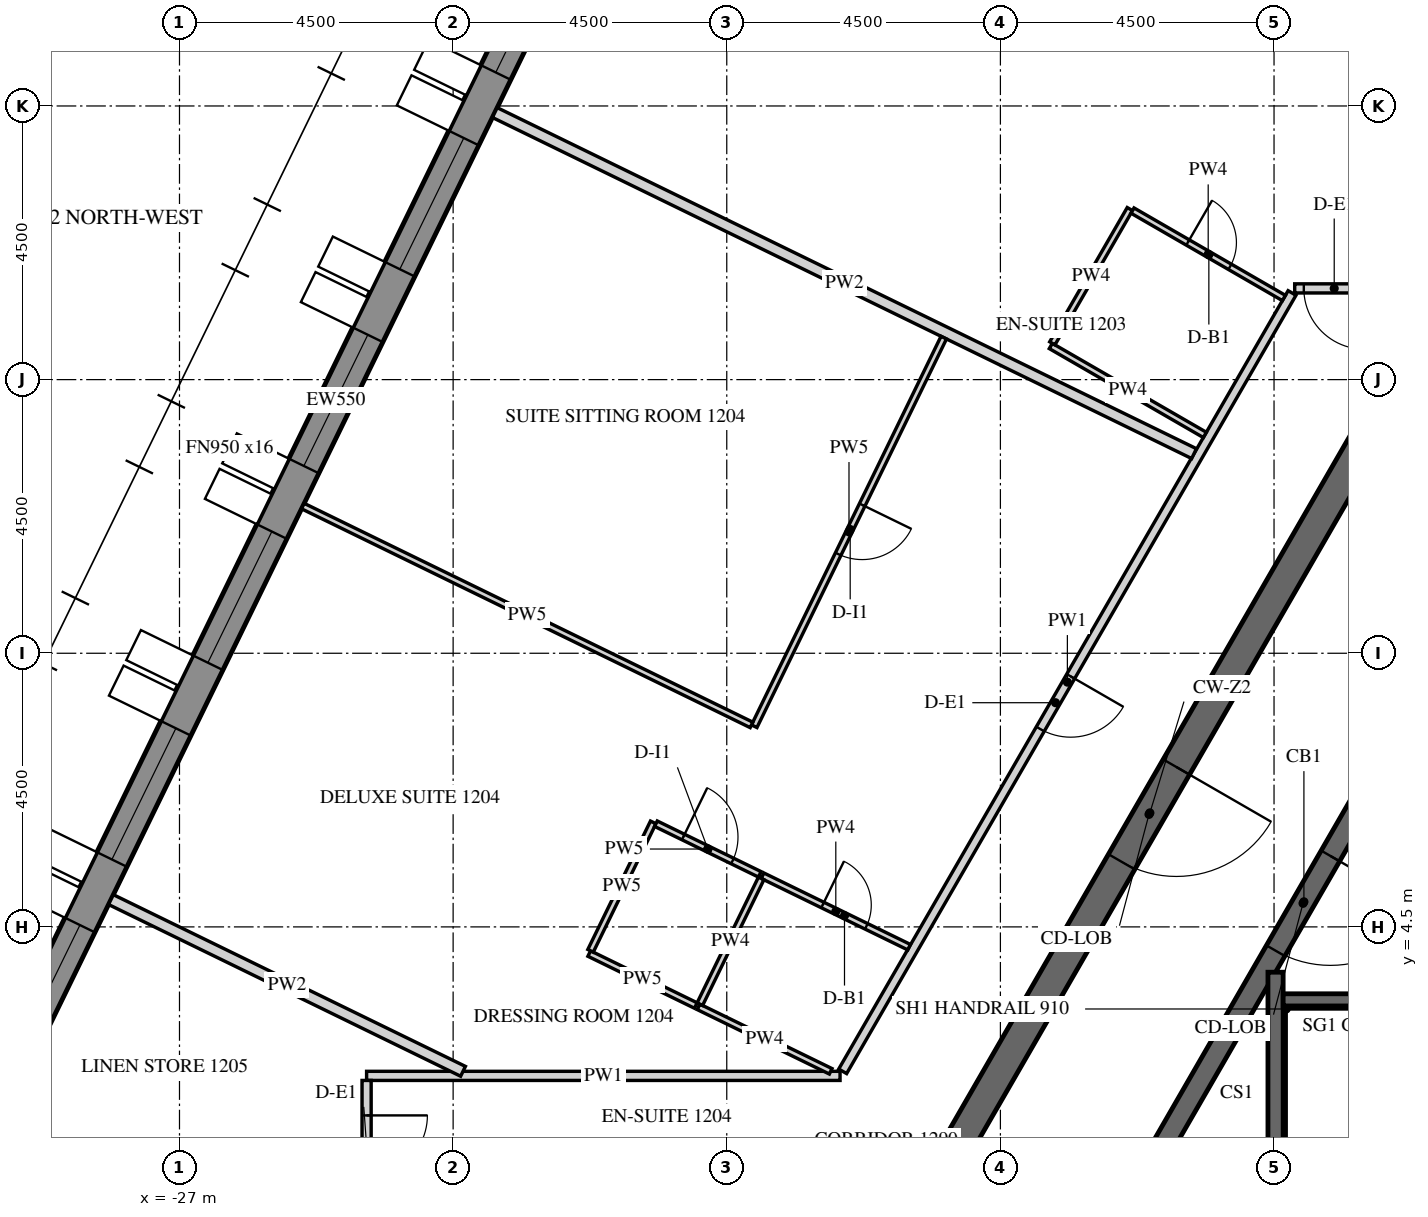
"""IFC4 building model, lengths in metres.
Left out: names, types, materials, properties, quantities, classifications, styles, units other than length and angle.
Written with IfcOpenShell. Run it as: python <this file> out.ifc"""

import sys

from ifc_helpers import new_model, si_unit, direction, frame, frame_2d, origin, place, context, subcontext, project, spatial, polyline, rectangle, outline, extrude, element, fill, save


model = new_model("IFC4")
c1 = context("Model", 3, precision=1e-05, world=origin(), true_north=direction((0.0, 1.0)))
c2 = subcontext(c1, "Body", "Model", "MODEL_VIEW")
j1 = project(units=[si_unit("LENGTHUNIT", "METRE"), si_unit("PLANEANGLEUNIT", "RADIAN")], contexts=[c1])
p1 = place(None, origin())
s1 = spatial("IfcSite", under=j1, at=p1, CompositionType="ELEMENT")
p2 = place(p1, origin())
s2 = spatial("IfcBuilding", under=s1, at=p2, CompositionType="ELEMENT")
p3 = place(p2, frame((0.0, 0.0, 164.4)))
s3 = spatial("IfcBuildingStorey", under=s2, at=p3, CompositionType="ELEMENT", Elevation=164.4)
p4 = place(p3, frame((-18.345, 25.633, -0.15), z_axis=(0.0, 0.0, 1.0), x_axis=(-0.43837181828, -0.898793718791, 0.0)))
e1 = element("IfcWall", 1, at=p4, inside=s3, PredefinedType="SOLIDWALL", context=c2, shape_type="SweptSolid", body=[
    extrude(outline(polyline([(-0.026, -0.275), (27.78, -0.275), (27.735, 0.275), (0.026, 0.275), (-0.026, -0.275)])), origin(), (0.0, 0.0, 1.0), 3.9),
])
p5 = place(p4, frame((1.879, 0.0, 1.05)))
e2 = element("IfcOpeningElement", 2, at=p5, cuts=e1, PredefinedType="OPENING", context=c2, shape_type="SweptSolid", body=[
    extrude(rectangle(XDim=2.4, YDim=2.4, at=frame_2d((1.2, 1.2))), frame((0.0, 0.285, 0.0), z_axis=(0.0, -1.0, 0.0), x_axis=(1.0, 0.0, 0.0)), (0.0, 0.0, 1.0), 0.57),
])
p6 = place(p4, frame((5.479, 0.0, 1.05)))
e3 = element("IfcOpeningElement", 3, at=p6, cuts=e1, PredefinedType="OPENING", context=c2, shape_type="SweptSolid", body=[
    extrude(rectangle(XDim=2.4, YDim=2.4, at=frame_2d((1.2, 1.2))), frame((0.0, 0.285, 0.0), z_axis=(0.0, -1.0, 0.0), x_axis=(1.0, 0.0, 0.0)), (0.0, 0.0, 1.0), 0.57),
])
p7 = place(p4, frame((9.079, 0.0, 1.05)))
e4 = element("IfcOpeningElement", 4, at=p7, cuts=e1, PredefinedType="OPENING", context=c2, shape_type="SweptSolid", body=[
    extrude(rectangle(XDim=2.4, YDim=2.4, at=frame_2d((1.2, 1.2))), frame((0.0, 0.285, 0.0), z_axis=(0.0, -1.0, 0.0), x_axis=(1.0, 0.0, 0.0)), (0.0, 0.0, 1.0), 0.57),
])
p8 = place(p4, frame((12.679, 0.0, 1.05)))
e5 = element("IfcOpeningElement", 5, at=p8, cuts=e1, PredefinedType="OPENING", context=c2, shape_type="SweptSolid", body=[
    extrude(rectangle(XDim=2.4, YDim=2.4, at=frame_2d((1.2, 1.2))), frame((0.0, 0.285, 0.0), z_axis=(0.0, -1.0, 0.0), x_axis=(1.0, 0.0, 0.0)), (0.0, 0.0, 1.0), 0.57),
])
p9 = place(p4, frame((16.279, 0.0, 1.05)))
e6 = element("IfcOpeningElement", 6, at=p9, cuts=e1, PredefinedType="OPENING", context=c2, shape_type="SweptSolid", body=[
    extrude(rectangle(XDim=2.4, YDim=2.4, at=frame_2d((1.2, 1.2))), frame((0.0, 0.285, 0.0), z_axis=(0.0, -1.0, 0.0), x_axis=(1.0, 0.0, 0.0)), (0.0, 0.0, 1.0), 0.57),
])
p10 = place(p4, frame((19.879, 0.0, 1.05)))
e7 = element("IfcOpeningElement", 7, at=p10, cuts=e1, PredefinedType="OPENING", context=c2, shape_type="SweptSolid", body=[
    extrude(rectangle(XDim=2.4, YDim=2.4, at=frame_2d((1.2, 1.2))), frame((0.0, 0.285, 0.0), z_axis=(0.0, -1.0, 0.0), x_axis=(1.0, 0.0, 0.0)), (0.0, 0.0, 1.0), 0.57),
])
p11 = place(p4, frame((23.479, 0.0, 1.05)))
e8 = element("IfcOpeningElement", 8, at=p11, cuts=e1, PredefinedType="OPENING", context=c2, shape_type="SweptSolid", body=[
    extrude(rectangle(XDim=2.4, YDim=2.4, at=frame_2d((1.2, 1.2))), frame((0.0, 0.285, 0.0), z_axis=(0.0, -1.0, 0.0), x_axis=(1.0, 0.0, 0.0)), (0.0, 0.0, 1.0), 0.57),
])
p12 = place(p3, frame((-7.361, 12.75, -0.15), z_axis=(0.0, 0.0, 1.0), x_axis=(-0.50000571537, -0.866022103989, 0.0)))
e9 = element("IfcWall", 9, at=p12, inside=s3, PredefinedType="SHEAR", context=c2, shape_type="SweptSolid", body=[
    extrude(outline(polyline([(-0.144, -0.25), (14.867, -0.25), (14.578, 0.25), (0.144, 0.25), (-0.144, -0.25)])), origin(), (0.0, 0.0, 1.0), 3.9),
])
p13 = place(p12, frame((6.49, 0.0, 0.15)))
e10 = element("IfcOpeningElement", 10, at=p13, cuts=e9, PredefinedType="OPENING", context=c2, shape_type="SweptSolid", body=[
    extrude(rectangle(XDim=1.8, YDim=2.4, at=frame_2d((0.9, 1.2))), frame((0.0, 0.26, 0.0), z_axis=(0.0, -1.0, 0.0), x_axis=(1.0, 0.0, 0.0)), (0.0, 0.0, 1.0), 0.52),
])
p14 = place(p3, frame((-5.673, 9.825, -0.15), z_axis=(0.0, 0.0, 1.0), x_axis=(-0.499995046907, -0.866028263435, 0.0)))
e11 = element("IfcWall", 11, at=p14, inside=s3, PredefinedType="SHEAR", context=c2, shape_type="SweptSolid", body=[
    extrude(outline(polyline([(-0.101, -0.175), (11.446, -0.175), (11.244, 0.175), (0.101, 0.175), (-0.101, -0.175)])), origin(), (0.0, 0.0, 1.0), 3.9),
])
p15 = place(p14, frame((4.801, 0.0, 0.15)))
e12 = element("IfcOpeningElement", 12, at=p15, cuts=e11, PredefinedType="OPENING", context=c2, shape_type="SweptSolid", body=[
    extrude(rectangle(XDim=1.8, YDim=2.4, at=frame_2d((0.9, 1.2))), frame((0.0, 0.185, 0.0), z_axis=(0.0, -1.0, 0.0), x_axis=(1.0, 0.0, 0.0)), (0.0, 0.0, 1.0), 0.37),
])
p16 = place(p3, frame((-8.975, -3.755, -0.25), z_axis=(0.0, 0.0, 1.0), x_axis=(0.0, 1.0, 0.0)))
e13 = element("IfcWall", 13, at=p16, inside=s3, PredefinedType="SHEAR", context=c2, shape_type="SweptSolid", body=[
    extrude(rectangle(XDim=7.51, YDim=0.25, at=frame_2d((3.755, 0.0))), origin(), (0.0, 0.0, 1.0), 3.9),
])
p17 = place(p3, frame((-8.85, 3.3, -0.25), z_axis=(0.0, 0.0, 1.0), x_axis=(1.0, 0.0, 0.0)))
e14 = element("IfcWall", 14, at=p17, inside=s3, PredefinedType="SHEAR", context=c2, shape_type="SweptSolid", body=[
    extrude(rectangle(XDim=2.95, YDim=0.2, at=frame_2d((1.475, 0.0))), origin(), (0.0, 0.0, 1.0), 3.9),
])
p18 = place(p3, frame((6.207, 15.0, 0.0), z_axis=(0.0, 0.0, 1.0), x_axis=(-1.0, 0.0, 0.0)))
e15 = element("IfcWall", 15, at=p18, inside=s3, PredefinedType="PARTITIONING", context=c2, shape_type="SweptSolid", body=[
    extrude(rectangle(XDim=14.867, YDim=0.15, at=frame_2d((7.433, 0.0))), origin(), (0.0, 0.0, 1.0), 2.988),
])
p19 = place(p18, frame((1.424, 0.0, 0.0)))
e16 = element("IfcOpeningElement", 16, at=p19, cuts=e15, PredefinedType="OPENING", context=c2, shape_type="SweptSolid", body=[
    extrude(rectangle(XDim=1.0, YDim=2.1, at=frame_2d((0.5, 1.05))), frame((0.0, 0.085, 0.0), z_axis=(0.0, -1.0, 0.0), x_axis=(1.0, 0.0, 0.0)), (0.0, 0.0, 1.0), 0.17),
])
p20 = place(p18, frame((10.424, 0.0, 0.0)))
e17 = element("IfcOpeningElement", 17, at=p20, cuts=e15, PredefinedType="OPENING", context=c2, shape_type="SweptSolid", body=[
    extrude(rectangle(XDim=1.0, YDim=2.1, at=frame_2d((0.5, 1.05))), frame((0.0, 0.085, 0.0), z_axis=(0.0, -1.0, 0.0), x_axis=(1.0, 0.0, 0.0)), (0.0, 0.0, 1.0), 0.17),
])
p21 = place(p18, frame((13.717, 0.0, 0.0)))
e18 = element("IfcOpeningElement", 18, at=p21, cuts=e15, PredefinedType="OPENING", context=c2, shape_type="SweptSolid", body=[
    extrude(rectangle(XDim=1.0, YDim=2.1, at=frame_2d((0.5, 1.05))), frame((0.0, 0.085, 0.0), z_axis=(0.0, -1.0, 0.0), x_axis=(1.0, 0.0, 0.0)), (0.0, 0.0, 1.0), 0.17),
])
p22 = place(p3, frame((-8.704, 14.925, 0.0), z_axis=(0.0, 0.0, 1.0), x_axis=(-0.499988884089, -0.866031821464, 0.0)))
e19 = element("IfcWall", 19, at=p22, inside=s3, PredefinedType="PARTITIONING", context=c2, shape_type="SweptSolid", body=[
    extrude(rectangle(XDim=14.78, YDim=0.15, at=frame_2d((7.39, 0.0))), origin(), (0.0, 0.0, 1.0), 2.988),
])
p23 = place(p22, frame((7.281, 0.0, 0.0)))
e20 = element("IfcOpeningElement", 20, at=p23, cuts=e19, PredefinedType="OPENING", context=c2, shape_type="SweptSolid", body=[
    extrude(rectangle(XDim=1.0, YDim=2.1, at=frame_2d((0.5, 1.05))), frame((0.0, 0.085, 0.0), z_axis=(0.0, -1.0, 0.0), x_axis=(1.0, 0.0, 0.0)), (0.0, 0.0, 1.0), 0.17),
])
p24 = place(p3, frame((-16.137, 2.05, 0.0), z_axis=(0.0, 0.0, 1.0), x_axis=(-1.0, 0.0, 0.0)))
e21 = element("IfcWall", 21, at=p24, inside=s3, PredefinedType="PARTITIONING", context=c2, shape_type="SweptSolid", body=[
    extrude(rectangle(XDim=7.786, YDim=0.15, at=frame_2d((3.893, 0.0))), origin(), (0.0, 0.0, 1.0), 2.988),
])
p25 = place(p3, frame((-23.923, 1.975, 0.0), z_axis=(0.0, 0.0, 1.0), x_axis=(0.0, -1.0, 0.0)))
e22 = element("IfcWall", 22, at=p25, inside=s3, PredefinedType="PARTITIONING", context=c2, shape_type="SweptSolid", body=[
    extrude(rectangle(XDim=1.725, YDim=0.15, at=frame_2d((0.863, 0.0))), origin(), (0.0, 0.0, 1.0), 2.988),
])
p26 = place(p25, frame((0.575, 0.0, 0.0)))
e23 = element("IfcOpeningElement", 23, at=p26, cuts=e22, PredefinedType="OPENING", context=c2, shape_type="SweptSolid", body=[
    extrude(rectangle(XDim=1.0, YDim=2.1, at=frame_2d((0.5, 1.05))), frame((0.0, 0.085, 0.0), z_axis=(0.0, -1.0, 0.0), x_axis=(1.0, 0.0, 0.0)), (0.0, 0.0, 1.0), 0.17),
])
p27 = place(p3, frame((-10.138, 12.591, 0.0), z_axis=(0.0, 0.0, 1.0), x_axis=(-0.866025730634, 0.499999433879, 0.0)))
e24 = element("IfcWall", 24, at=p27, inside=s3, PredefinedType="PARTITIONING", context=c2, shape_type="SweptSolid", body=[
    extrude(rectangle(XDim=2.925, YDim=0.1, at=frame_2d((1.462, 0.0))), origin(), (0.0, 0.0, 1.0), 2.988),
])
p28 = place(p3, frame((-12.646, 14.096, 0.0), z_axis=(0.0, 0.0, 1.0), x_axis=(0.500020783669, 0.866013403995, 0.0)))
e25 = element("IfcWall", 25, at=p28, inside=s3, PredefinedType="PARTITIONING", context=c2, shape_type="SweptSolid", body=[
    extrude(rectangle(XDim=2.55, YDim=0.1, at=frame_2d((1.275, 0.0))), origin(), (0.0, 0.0, 1.0), 2.988),
])
p29 = place(p3, frame((-11.328, 16.28, 0.0), z_axis=(0.0, 0.0, 1.0), x_axis=(0.865981939951, -0.500075274012, 0.0)))
e26 = element("IfcWall", 26, at=p29, inside=s3, PredefinedType="PARTITIONING", context=c2, shape_type="SweptSolid", body=[
    extrude(rectangle(XDim=2.875, YDim=0.1, at=frame_2d((1.438, 0.0))), origin(), (0.0, 0.0, 1.0), 2.988),
])
p30 = place(p29, frame((1.05, 0.0, 0.0)))
e27 = element("IfcOpeningElement", 27, at=p30, cuts=e26, PredefinedType="OPENING", context=c2, shape_type="SweptSolid", body=[
    extrude(rectangle(XDim=0.8, YDim=2.1, at=frame_2d((0.4, 1.05))), frame((0.0, 0.06, 0.0), z_axis=(0.0, -1.0, 0.0), x_axis=(1.0, 0.0, 0.0)), (0.0, 0.0, 1.0), 0.12),
])
p31 = place(p3, frame((-21.815, 17.892, 0.0), z_axis=(0.0, 0.0, 1.0), x_axis=(0.898799253997, -0.438360469265, 0.0)))
e28 = element("IfcWall", 28, at=p31, inside=s3, PredefinedType="PARTITIONING", context=c2, shape_type="SweptSolid", body=[
    extrude(rectangle(XDim=12.794, YDim=0.18, at=frame_2d((6.397, 0.0))), origin(), (0.0, 0.0, 1.0), 2.988),
])
p32 = place(p3, frame((-16.291, 2.125, 0.0), z_axis=(0.0, 0.0, 1.0), x_axis=(-0.898785911157, 0.438387825909, 0.0)))
e29 = element("IfcWall", 29, at=p32, inside=s3, PredefinedType="PARTITIONING", context=c2, shape_type="SweptSolid", body=[
    extrude(rectangle(XDim=2.418, YDim=0.1, at=frame_2d((1.209, 0.0))), origin(), (0.0, 0.0, 1.0), 2.988),
])
p33 = place(p3, frame((-17.412, 5.342, 0.0), z_axis=(0.0, 0.0, 1.0), x_axis=(0.898825304183, -0.43830705283, 0.0)))
e30 = element("IfcWall", 30, at=p33, inside=s3, PredefinedType="PARTITIONING", context=c2, shape_type="SweptSolid", body=[
    extrude(rectangle(XDim=2.682, YDim=0.1, at=frame_2d((1.341, 0.0))), origin(), (0.0, 0.0, 1.0), 2.988),
])
p34 = place(p33, frame((1.1, 0.0, 0.0)))
e31 = element("IfcOpeningElement", 31, at=p34, cuts=e30, PredefinedType="OPENING", context=c2, shape_type="SweptSolid", body=[
    extrude(rectangle(XDim=0.8, YDim=2.1, at=frame_2d((0.4, 1.05))), frame((0.0, 0.06, 0.0), z_axis=(0.0, -1.0, 0.0), x_axis=(1.0, 0.0, 0.0)), (0.0, 0.0, 1.0), 0.12),
])
p35 = place(p3, frame((-18.509, 3.207, 0.0), z_axis=(0.0, 0.0, 1.0), x_axis=(-0.898815368173, 0.438327427772, 0.0)))
e32 = element("IfcWall", 32, at=p35, inside=s3, PredefinedType="PARTITIONING", context=c2, shape_type="SweptSolid", body=[
    extrude(rectangle(XDim=1.95, YDim=0.1, at=frame_2d((0.975, 0.0))), origin(), (0.0, 0.0, 1.0), 2.988),
])
p36 = place(p3, frame((-20.24, 4.107, 0.0), z_axis=(0.0, 0.0, 1.0), x_axis=(0.438382697704, 0.89878841245, 0.0)))
e33 = element("IfcWall", 33, at=p36, inside=s3, PredefinedType="PARTITIONING", context=c2, shape_type="SweptSolid", body=[
    extrude(rectangle(XDim=2.35, YDim=0.1, at=frame_2d((1.175, 0.0))), origin(), (0.0, 0.0, 1.0), 2.988),
])
p37 = place(p3, frame((-19.165, 6.197, 0.0), z_axis=(0.0, 0.0, 1.0), x_axis=(0.898753624926, -0.43845401319, 0.0)))
e34 = element("IfcWall", 34, at=p37, inside=s3, PredefinedType="PARTITIONING", context=c2, shape_type="SweptSolid", body=[
    extrude(rectangle(XDim=1.9, YDim=0.1, at=frame_2d((0.95, 0.0))), origin(), (0.0, 0.0, 1.0), 2.988),
])
p38 = place(p37, frame((0.5, 0.0, 0.0)))
e35 = element("IfcOpeningElement", 35, at=p38, cuts=e34, PredefinedType="OPENING", context=c2, shape_type="SweptSolid", body=[
    extrude(rectangle(XDim=0.9, YDim=2.1, at=frame_2d((0.45, 1.05))), frame((0.0, 0.06, 0.0), z_axis=(0.0, -1.0, 0.0), x_axis=(1.0, 0.0, 0.0)), (0.0, 0.0, 1.0), 0.12),
])
p39 = place(p3, frame((-14.431, 14.19, 0.0), z_axis=(0.0, 0.0, 1.0), x_axis=(-0.438387776054, -0.898785935475, 0.0)))
e36 = element("IfcWall", 36, at=p39, inside=s3, PredefinedType="PARTITIONING", context=c2, shape_type="SweptSolid", body=[
    extrude(rectangle(XDim=7.11, YDim=0.1, at=frame_2d((3.555, 0.0))), origin(), (0.0, 0.0, 1.0), 2.988),
])
p40 = place(p39, frame((3.06, 0.0, 0.0)))
e37 = element("IfcOpeningElement", 37, at=p40, cuts=e36, PredefinedType="OPENING", context=c2, shape_type="SweptSolid", body=[
    extrude(rectangle(XDim=0.9, YDim=2.1, at=frame_2d((0.45, 1.05))), frame((0.0, 0.06, 0.0), z_axis=(0.0, -1.0, 0.0), x_axis=(1.0, 0.0, 0.0)), (0.0, 0.0, 1.0), 0.12),
])
p41 = place(p3, frame((-17.593, 7.822, 0.0), z_axis=(0.0, 0.0, 1.0), x_axis=(-0.898803316846, 0.438352138842, 0.0)))
e38 = element("IfcWall", 38, at=p41, inside=s3, PredefinedType="PARTITIONING", context=c2, shape_type="SweptSolid", body=[
    extrude(rectangle(XDim=8.208, YDim=0.1, at=frame_2d((4.104, 0.0))), origin(), (0.0, 0.0, 1.0), 2.988),
])
p42 = place(p3, frame((-28.127, 4.949, 0.0), z_axis=(0.0, 0.0, 1.0), x_axis=(0.898795032868, -0.438369124017, 0.0)))
e39 = element("IfcWall", 39, at=p42, inside=s3, PredefinedType="PARTITIONING", context=c2, shape_type="SweptSolid", body=[
    extrude(rectangle(XDim=6.442, YDim=0.18, at=frame_2d((3.221, 0.0))), origin(), (0.0, 0.0, 1.0), 2.988),
])
p43 = place(p3, frame((-17.434, 5.297, 0.0), z_axis=(0.0, 0.0, 1.0), x_axis=(-0.438402718006, -0.898778647302, 0.0)))
e40 = element("IfcWall", 40, at=p43, inside=s3, PredefinedType="PARTITIONING", context=c2, shape_type="SweptSolid", body=[
    extrude(rectangle(XDim=2.3, YDim=0.1, at=frame_2d((1.15, 0.0))), origin(), (0.0, 0.0, 1.0), 2.988),
])
p44 = place(p6, frame((0.0, 0.205, 0.0)))
e41 = element("IfcWindow", 41, at=p44, inside=s3, PartitioningType="DOUBLE_PANEL_VERTICAL", PredefinedType="WINDOW", context=c2, shape_type="SweptSolid", body=[
    extrude(rectangle(XDim=2.4, YDim=2.4, at=frame_2d((1.2, 1.2))), frame((0.0, 0.03, 0.0), z_axis=(0.0, -1.0, 0.0), x_axis=(1.0, 0.0, 0.0)), (0.0, 0.0, 1.0), 0.06),
])
fill(e3, e41)
p45 = place(p7, frame((0.0, 0.205, 0.0)))
e42 = element("IfcWindow", 42, at=p45, inside=s3, PartitioningType="DOUBLE_PANEL_VERTICAL", PredefinedType="WINDOW", context=c2, shape_type="SweptSolid", body=[
    extrude(rectangle(XDim=2.4, YDim=2.4, at=frame_2d((1.2, 1.2))), frame((0.0, 0.03, 0.0), z_axis=(0.0, -1.0, 0.0), x_axis=(1.0, 0.0, 0.0)), (0.0, 0.0, 1.0), 0.06),
])
fill(e4, e42)
p46 = place(p8, frame((0.0, 0.205, 0.0)))
e43 = element("IfcWindow", 43, at=p46, inside=s3, PartitioningType="DOUBLE_PANEL_VERTICAL", PredefinedType="WINDOW", context=c2, shape_type="SweptSolid", body=[
    extrude(rectangle(XDim=2.4, YDim=2.4, at=frame_2d((1.2, 1.2))), frame((0.0, 0.03, 0.0), z_axis=(0.0, -1.0, 0.0), x_axis=(1.0, 0.0, 0.0)), (0.0, 0.0, 1.0), 0.06),
])
fill(e5, e43)
p47 = place(p9, frame((0.0, 0.205, 0.0)))
e44 = element("IfcWindow", 44, at=p47, inside=s3, PartitioningType="DOUBLE_PANEL_VERTICAL", PredefinedType="WINDOW", context=c2, shape_type="SweptSolid", body=[
    extrude(rectangle(XDim=2.4, YDim=2.4, at=frame_2d((1.2, 1.2))), frame((0.0, 0.03, 0.0), z_axis=(0.0, -1.0, 0.0), x_axis=(1.0, 0.0, 0.0)), (0.0, 0.0, 1.0), 0.06),
])
fill(e6, e44)
p48 = place(p10, frame((0.0, 0.205, 0.0)))
e45 = element("IfcWindow", 45, at=p48, inside=s3, PartitioningType="DOUBLE_PANEL_VERTICAL", PredefinedType="WINDOW", context=c2, shape_type="SweptSolid", body=[
    extrude(rectangle(XDim=2.4, YDim=2.4, at=frame_2d((1.2, 1.2))), frame((0.0, 0.03, 0.0), z_axis=(0.0, -1.0, 0.0), x_axis=(1.0, 0.0, 0.0)), (0.0, 0.0, 1.0), 0.06),
])
fill(e7, e45)
p49 = place(p11, frame((0.0, 0.205, 0.0)))
e46 = element("IfcWindow", 46, at=p49, inside=s3, PartitioningType="DOUBLE_PANEL_VERTICAL", PredefinedType="WINDOW", context=c2, shape_type="SweptSolid", body=[
    extrude(rectangle(XDim=2.4, YDim=2.4, at=frame_2d((1.2, 1.2))), frame((0.0, 0.03, 0.0), z_axis=(0.0, -1.0, 0.0), x_axis=(1.0, 0.0, 0.0)), (0.0, 0.0, 1.0), 0.06),
])
fill(e8, e46)
p50 = place(p13, origin())
e47 = element("IfcDoor", 47, at=p50, inside=s3, OperationType="DOUBLE_DOOR_SINGLE_SWING", PredefinedType="DOOR", context=c2, shape_type="SweptSolid", body=[
    extrude(rectangle(XDim=1.8, YDim=2.4, at=frame_2d((0.9, 1.2))), frame((0.0, 0.025, 0.0), z_axis=(0.0, -1.0, 0.0), x_axis=(1.0, 0.0, 0.0)), (0.0, 0.0, 1.0), 0.05),
])
fill(e10, e47)
p51 = place(p15, origin())
e48 = element("IfcDoor", 48, at=p51, inside=s3, OperationType="DOUBLE_DOOR_SINGLE_SWING", PredefinedType="DOOR", context=c2, shape_type="SweptSolid", body=[
    extrude(rectangle(XDim=1.8, YDim=2.4, at=frame_2d((0.9, 1.2))), frame((0.0, 0.025, 0.0), z_axis=(0.0, -1.0, 0.0), x_axis=(1.0, 0.0, 0.0)), (0.0, 0.0, 1.0), 0.05),
])
fill(e12, e48)
p52 = place(p21, origin())
e49 = element("IfcDoor", 49, at=p52, inside=s3, OperationType="SINGLE_SWING_LEFT", PredefinedType="DOOR", context=c2, shape_type="SweptSolid", body=[
    extrude(rectangle(XDim=1.0, YDim=2.1, at=frame_2d((0.5, 1.05))), frame((0.0, 0.025, 0.0), z_axis=(0.0, -1.0, 0.0), x_axis=(1.0, 0.0, 0.0)), (0.0, 0.0, 1.0), 0.05),
])
fill(e18, e49)
p53 = place(p30, origin())
e50 = element("IfcDoor", 50, at=p53, inside=s3, OperationType="SINGLE_SWING_LEFT", PredefinedType="DOOR", context=c2, shape_type="SweptSolid", body=[
    extrude(rectangle(XDim=0.8, YDim=2.1, at=frame_2d((0.4, 1.05))), frame((0.0, 0.025, 0.0), z_axis=(0.0, -1.0, 0.0), x_axis=(1.0, 0.0, 0.0)), (0.0, 0.0, 1.0), 0.05),
])
fill(e27, e50)
p54 = place(p23, origin())
e51 = element("IfcDoor", 51, at=p54, inside=s3, OperationType="SINGLE_SWING_RIGHT", PredefinedType="DOOR", context=c2, shape_type="SweptSolid", body=[
    extrude(rectangle(XDim=1.0, YDim=2.1, at=frame_2d((0.5, 1.05))), frame((0.0, 0.025, 0.0), z_axis=(0.0, -1.0, 0.0), x_axis=(1.0, 0.0, 0.0)), (0.0, 0.0, 1.0), 0.05),
])
fill(e20, e51)
p55 = place(p34, origin())
e52 = element("IfcDoor", 52, at=p55, inside=s3, OperationType="SINGLE_SWING_LEFT", PredefinedType="DOOR", context=c2, shape_type="SweptSolid", body=[
    extrude(rectangle(XDim=0.8, YDim=2.1, at=frame_2d((0.4, 1.05))), frame((0.0, 0.025, 0.0), z_axis=(0.0, -1.0, 0.0), x_axis=(1.0, 0.0, 0.0)), (0.0, 0.0, 1.0), 0.05),
])
fill(e31, e52)
p56 = place(p38, origin())
e53 = element("IfcDoor", 53, at=p56, inside=s3, OperationType="SINGLE_SWING_RIGHT", PredefinedType="DOOR", context=c2, shape_type="SweptSolid", body=[
    extrude(rectangle(XDim=0.9, YDim=2.1, at=frame_2d((0.45, 1.05))), frame((0.0, 0.025, 0.0), z_axis=(0.0, -1.0, 0.0), x_axis=(1.0, 0.0, 0.0)), (0.0, 0.0, 1.0), 0.05),
])
fill(e35, e53)
p57 = place(p40, origin())
e54 = element("IfcDoor", 54, at=p57, inside=s3, OperationType="SINGLE_SWING_RIGHT", PredefinedType="DOOR", context=c2, shape_type="SweptSolid", body=[
    extrude(rectangle(XDim=0.9, YDim=2.1, at=frame_2d((0.45, 1.05))), frame((0.0, 0.025, 0.0), z_axis=(0.0, -1.0, 0.0), x_axis=(1.0, 0.0, 0.0)), (0.0, 0.0, 1.0), 0.05),
])
fill(e37, e54)
p58 = place(p26, origin())
e55 = element("IfcDoor", 55, at=p58, inside=s3, OperationType="SINGLE_SWING_LEFT", PredefinedType="DOOR", context=c2, shape_type="SweptSolid", body=[
    extrude(rectangle(XDim=1.0, YDim=2.1, at=frame_2d((0.5, 1.05))), frame((0.0, 0.025, 0.0), z_axis=(0.0, -1.0, 0.0), x_axis=(1.0, 0.0, 0.0)), (0.0, 0.0, 1.0), 0.05),
])
fill(e23, e55)
save(model, sys.argv[1])
